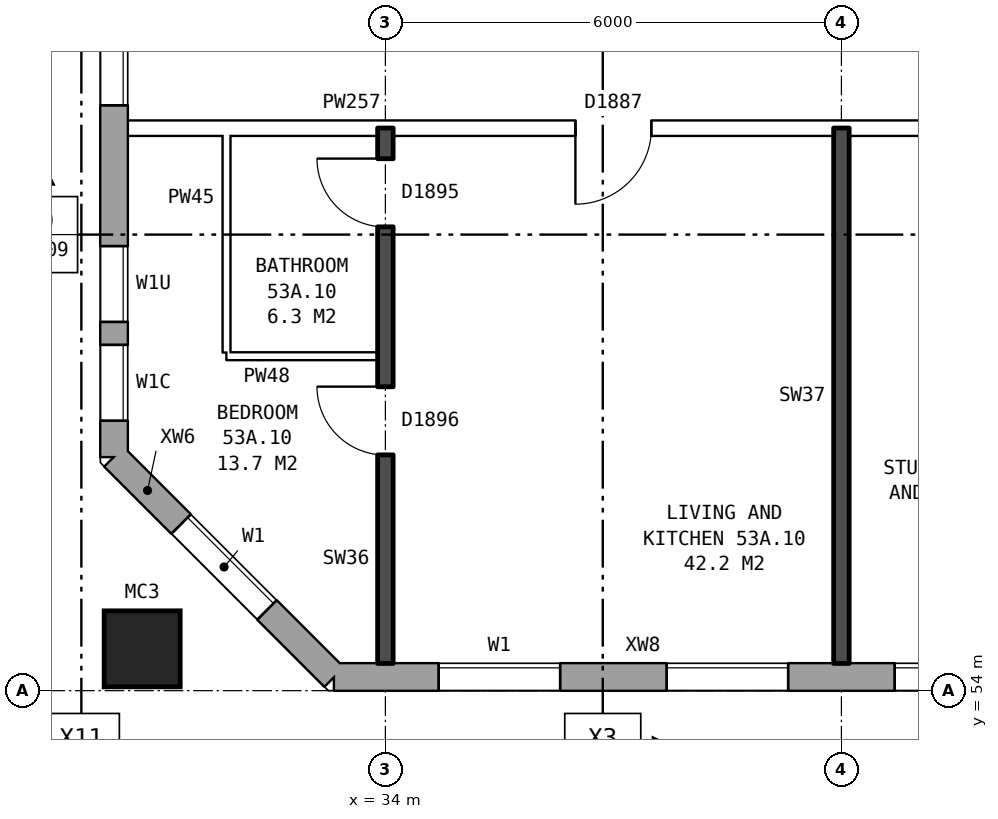
"""IFC4 building model, lengths in metres.
Left out: names, types, materials, properties, quantities, classifications, styles, units other than length and angle.
Written with IfcOpenShell. Run it as: python <this file> out.ifc"""

import sys

from ifc_helpers import new_model, si_unit, direction, frame, frame_2d, origin, origin_2d, place, context, subcontext, project, spatial, rectangle, hollow_rectangle, extrude, element, fill, save


model = new_model("IFC4")
c1 = context("Model", 3, precision=1e-05, world=origin(), true_north=direction((0.0, 1.0)))
c2 = subcontext(c1, "Body", "Model", "MODEL_VIEW")
j1 = project(units=[si_unit("LENGTHUNIT", "METRE"), si_unit("PLANEANGLEUNIT", "RADIAN")], contexts=[c1])
p1 = place(None, origin())
s1 = spatial("IfcSite", under=j1, at=p1, CompositionType="ELEMENT")
p2 = place(p1, origin())
s2 = spatial("IfcBuilding", under=s1, at=p2, CompositionType="ELEMENT")
p3 = place(p2, frame((0.0, 0.0, 188.2)))
s3 = spatial("IfcBuildingStorey", under=s2, at=p3, CompositionType="ELEMENT", Elevation=188.2)
p4 = place(p3, frame((30.8, 54.55, 0.0), z_axis=(0.0, 0.0, 1.0), x_axis=(1.0, 0.0, 0.0)))
e1 = element("IfcColumn", 1, at=p4, inside=s3, PredefinedType="COLUMN", context=c2, shape_type="SweptSolid", body=[
    extrude(hollow_rectangle(XDim=1.0, YDim=1.0, WallThickness=0.055, at=origin_2d()), origin(), (0.0, 0.0, 1.0), 3.1),
])
p5 = place(p3, frame((30.43, 57.075, 0.0), z_axis=(0.0, 0.0, 1.0), x_axis=(0.707106781187, -0.707106781187, 0.0)))
e2 = element("IfcWall", 2, at=p5, inside=s3, PredefinedType="STANDARD", context=c2, shape_type="SweptSolid", body=[
    extrude(rectangle(XDim=4.094, YDim=0.36, at=frame_2d((2.047, 0.0))), origin(), (0.0, 0.0, 1.0), 2.85),
])
p6 = place(p5, frame((1.247, 0.0, 0.8)))
e3 = element("IfcOpeningElement", 3, at=p6, cuts=e2, PredefinedType="OPENING", context=c2, shape_type="SweptSolid", body=[
    extrude(rectangle(XDim=1.6, YDim=1.8, at=frame_2d((0.8, 0.9))), frame((0.0, 0.19, 0.0), z_axis=(0.0, -1.0, 0.0), x_axis=(1.0, 0.0, 0.0)), (0.0, 0.0, 1.0), 0.38),
])
p7 = place(p3, frame((33.325, 54.18, 0.0), z_axis=(0.0, 0.0, 1.0), x_axis=(1.0, 0.0, 0.0)))
e4 = element("IfcWall", 4, at=p7, inside=s3, PredefinedType="STANDARD", context=c2, shape_type="SweptSolid", body=[
    extrude(rectangle(XDim=39.601, YDim=0.36, at=frame_2d((19.8, 0.0))), origin(), (0.0, 0.0, 1.0), 2.85),
])
p8 = place(p7, frame((1.375, 0.0, 0.8)))
e5 = element("IfcOpeningElement", 5, at=p8, cuts=e4, PredefinedType="OPENING", context=c2, shape_type="SweptSolid", body=[
    extrude(rectangle(XDim=1.6, YDim=1.8, at=frame_2d((0.8, 0.9))), frame((0.0, 0.19, 0.0), z_axis=(0.0, -1.0, 0.0), x_axis=(1.0, 0.0, 0.0)), (0.0, 0.0, 1.0), 0.38),
])
p9 = place(p7, frame((4.375, 0.0, 0.8)))
e6 = element("IfcOpeningElement", 6, at=p9, cuts=e4, PredefinedType="OPENING", context=c2, shape_type="SweptSolid", body=[
    extrude(rectangle(XDim=1.6, YDim=1.8, at=frame_2d((0.8, 0.9))), frame((0.0, 0.19, 0.0), z_axis=(0.0, -1.0, 0.0), x_axis=(1.0, 0.0, 0.0)), (0.0, 0.0, 1.0), 0.38),
])
p10 = place(p7, frame((7.375, 0.0, 0.8)))
e7 = element("IfcOpeningElement", 7, at=p10, cuts=e4, PredefinedType="OPENING", context=c2, shape_type="SweptSolid", body=[
    extrude(rectangle(XDim=1.6, YDim=1.8, at=frame_2d((0.8, 0.9))), frame((0.0, 0.19, 0.0), z_axis=(0.0, -1.0, 0.0), x_axis=(1.0, 0.0, 0.0)), (0.0, 0.0, 1.0), 0.38),
])
p11 = place(p7, frame((10.375, 0.0, 0.8)))
e8 = element("IfcOpeningElement", 8, at=p11, cuts=e4, PredefinedType="OPENING", context=c2, shape_type="SweptSolid", body=[
    extrude(rectangle(XDim=1.6, YDim=1.8, at=frame_2d((0.8, 0.9))), frame((0.0, 0.19, 0.0), z_axis=(0.0, -1.0, 0.0), x_axis=(1.0, 0.0, 0.0)), (0.0, 0.0, 1.0), 0.38),
])
p12 = place(p7, frame((12.875, 0.0, 0.8)))
e9 = element("IfcOpeningElement", 9, at=p12, cuts=e4, PredefinedType="OPENING", context=c2, shape_type="SweptSolid", body=[
    extrude(rectangle(XDim=1.2, YDim=1.8, at=frame_2d((0.6, 0.9))), frame((0.0, 0.19, 0.0), z_axis=(0.0, -1.0, 0.0), x_axis=(1.0, 0.0, 0.0)), (0.0, 0.0, 1.0), 0.38),
])
p13 = place(p7, frame((16.225, 0.0, 0.8)))
e10 = element("IfcOpeningElement", 10, at=p13, cuts=e4, PredefinedType="OPENING", context=c2, shape_type="SweptSolid", body=[
    extrude(rectangle(XDim=0.6, YDim=0.9, at=frame_2d((0.3, 0.45))), frame((0.0, 0.19, 0.0), z_axis=(0.0, -1.0, 0.0), x_axis=(1.0, 0.0, 0.0)), (0.0, 0.0, 1.0), 0.38),
])
p14 = place(p7, frame((19.375, 0.0, 0.8)))
e11 = element("IfcOpeningElement", 11, at=p14, cuts=e4, PredefinedType="OPENING", context=c2, shape_type="SweptSolid", body=[
    extrude(rectangle(XDim=1.6, YDim=1.8, at=frame_2d((0.8, 0.9))), frame((0.0, 0.19, 0.0), z_axis=(0.0, -1.0, 0.0), x_axis=(1.0, 0.0, 0.0)), (0.0, 0.0, 1.0), 0.38),
])
p15 = place(p7, frame((21.875, 0.0, 0.15)))
e12 = element("IfcOpeningElement", 12, at=p15, cuts=e4, PredefinedType="OPENING", context=c2, shape_type="SweptSolid", body=[
    extrude(rectangle(XDim=1.2, YDim=1.8, at=frame_2d((0.6, 0.9))), frame((0.0, 0.19, 0.0), z_axis=(0.0, -1.0, 0.0), x_axis=(1.0, 0.0, 0.0)), (0.0, 0.0, 1.0), 0.38),
])
p16 = place(p7, frame((25.375, 0.0, 0.8)))
e13 = element("IfcOpeningElement", 13, at=p16, cuts=e4, PredefinedType="OPENING", context=c2, shape_type="SweptSolid", body=[
    extrude(rectangle(XDim=1.6, YDim=1.8, at=frame_2d((0.8, 0.9))), frame((0.0, 0.19, 0.0), z_axis=(0.0, -1.0, 0.0), x_axis=(1.0, 0.0, 0.0)), (0.0, 0.0, 1.0), 0.38),
])
p17 = place(p7, frame((28.375, 0.0, 0.8)))
e14 = element("IfcOpeningElement", 14, at=p17, cuts=e4, PredefinedType="OPENING", context=c2, shape_type="SweptSolid", body=[
    extrude(rectangle(XDim=1.6, YDim=1.8, at=frame_2d((0.8, 0.9))), frame((0.0, 0.19, 0.0), z_axis=(0.0, -1.0, 0.0), x_axis=(1.0, 0.0, 0.0)), (0.0, 0.0, 1.0), 0.38),
])
p18 = place(p7, frame((31.375, 0.0, 0.8)))
e15 = element("IfcOpeningElement", 15, at=p18, cuts=e4, PredefinedType="OPENING", context=c2, shape_type="SweptSolid", body=[
    extrude(rectangle(XDim=1.6, YDim=1.8, at=frame_2d((0.8, 0.9))), frame((0.0, 0.19, 0.0), z_axis=(0.0, -1.0, 0.0), x_axis=(1.0, 0.0, 0.0)), (0.0, 0.0, 1.0), 0.38),
])
p19 = place(p7, frame((34.375, 0.0, 0.8)))
e16 = element("IfcOpeningElement", 16, at=p19, cuts=e4, PredefinedType="OPENING", context=c2, shape_type="SweptSolid", body=[
    extrude(rectangle(XDim=1.6, YDim=1.8, at=frame_2d((0.8, 0.9))), frame((0.0, 0.19, 0.0), z_axis=(0.0, -1.0, 0.0), x_axis=(1.0, 0.0, 0.0)), (0.0, 0.0, 1.0), 0.38),
])
p20 = place(p7, frame((37.375, 0.0, 0.8)))
e17 = element("IfcOpeningElement", 17, at=p20, cuts=e4, PredefinedType="OPENING", context=c2, shape_type="SweptSolid", body=[
    extrude(rectangle(XDim=1.6, YDim=1.8, at=frame_2d((0.8, 0.9))), frame((0.0, 0.19, 0.0), z_axis=(0.0, -1.0, 0.0), x_axis=(1.0, 0.0, 0.0)), (0.0, 0.0, 1.0), 0.38),
])
p21 = place(p7, frame((14.375, 0.0, 1.6)))
e18 = element("IfcOpeningElement", 18, at=p21, cuts=e4, PredefinedType="OPENING", context=c2, shape_type="SweptSolid", body=[
    extrude(rectangle(XDim=0.6, YDim=0.9, at=frame_2d((0.3, 0.45))), frame((0.0, 0.19, 0.0), z_axis=(0.0, -1.0, 0.0), x_axis=(1.0, 0.0, 0.0)), (0.0, 0.0, 1.0), 0.38),
])
p22 = place(p7, frame((17.125, 0.0, 0.8)))
e19 = element("IfcOpeningElement", 19, at=p22, cuts=e4, PredefinedType="OPENING", context=c2, shape_type="SweptSolid", body=[
    extrude(rectangle(XDim=1.2, YDim=1.8, at=frame_2d((0.6, 0.9))), frame((0.0, 0.19, 0.0), z_axis=(0.0, -1.0, 0.0), x_axis=(1.0, 0.0, 0.0)), (0.0, 0.0, 1.0), 0.38),
])
p23 = place(p7, frame((23.375, 0.0, 0.15)))
e20 = element("IfcOpeningElement", 20, at=p23, cuts=e4, PredefinedType="OPENING", context=c2, shape_type="SweptSolid", body=[
    extrude(rectangle(XDim=0.6, YDim=0.9, at=frame_2d((0.3, 0.45))), frame((0.0, 0.19, 0.0), z_axis=(0.0, -1.0, 0.0), x_axis=(1.0, 0.0, 0.0)), (0.0, 0.0, 1.0), 0.38),
])
p24 = place(p3, frame((30.43, 82.925, 0.0), z_axis=(0.0, 0.0, 1.0), x_axis=(0.0, -1.0, 0.0)))
e21 = element("IfcWall", 21, at=p24, inside=s3, PredefinedType="STANDARD", context=c2, shape_type="SweptSolid", body=[
    extrude(rectangle(XDim=25.851, YDim=0.36, at=frame_2d((12.925, 0.0))), origin(), (0.0, 0.0, 1.0), 2.85),
])
p25 = place(p24, frame((0.3, 0.0, 0.8)))
e22 = element("IfcOpeningElement", 22, at=p25, cuts=e21, PredefinedType="OPENING", context=c2, shape_type="SweptSolid", body=[
    extrude(rectangle(XDim=1.2, YDim=1.8, at=frame_2d((0.6, 0.9))), frame((0.0, 0.19, 0.0), z_axis=(0.0, -1.0, 0.0), x_axis=(1.0, 0.0, 0.0)), (0.0, 0.0, 1.0), 0.38),
])
p26 = place(p24, frame((4.625, 0.0, 0.8)))
e23 = element("IfcOpeningElement", 23, at=p26, cuts=e21, PredefinedType="OPENING", context=c2, shape_type="SweptSolid", body=[
    extrude(rectangle(XDim=1.6, YDim=1.8, at=frame_2d((0.8, 0.9))), frame((0.0, 0.19, 0.0), z_axis=(0.0, -1.0, 0.0), x_axis=(1.0, 0.0, 0.0)), (0.0, 0.0, 1.0), 0.38),
])
p27 = place(p24, frame((7.625, 0.0, 0.8)))
e24 = element("IfcOpeningElement", 24, at=p27, cuts=e21, PredefinedType="OPENING", context=c2, shape_type="SweptSolid", body=[
    extrude(rectangle(XDim=1.6, YDim=1.8, at=frame_2d((0.8, 0.9))), frame((0.0, 0.19, 0.0), z_axis=(0.0, -1.0, 0.0), x_axis=(1.0, 0.0, 0.0)), (0.0, 0.0, 1.0), 0.38),
])
p28 = place(p24, frame((10.625, 0.0, 0.8)))
e25 = element("IfcOpeningElement", 25, at=p28, cuts=e21, PredefinedType="OPENING", context=c2, shape_type="SweptSolid", body=[
    extrude(rectangle(XDim=1.6, YDim=1.8, at=frame_2d((0.8, 0.9))), frame((0.0, 0.19, 0.0), z_axis=(0.0, -1.0, 0.0), x_axis=(1.0, 0.0, 0.0)), (0.0, 0.0, 1.0), 0.38),
])
p29 = place(p24, frame((13.625, 0.0, 0.8)))
e26 = element("IfcOpeningElement", 26, at=p29, cuts=e21, PredefinedType="OPENING", context=c2, shape_type="SweptSolid", body=[
    extrude(rectangle(XDim=1.6, YDim=1.8, at=frame_2d((0.8, 0.9))), frame((0.0, 0.19, 0.0), z_axis=(0.0, -1.0, 0.0), x_axis=(1.0, 0.0, 0.0)), (0.0, 0.0, 1.0), 0.38),
])
p30 = place(p24, frame((16.625, 0.0, 0.8)))
e27 = element("IfcOpeningElement", 27, at=p30, cuts=e21, PredefinedType="OPENING", context=c2, shape_type="SweptSolid", body=[
    extrude(rectangle(XDim=1.6, YDim=1.8, at=frame_2d((0.8, 0.9))), frame((0.0, 0.19, 0.0), z_axis=(0.0, -1.0, 0.0), x_axis=(1.0, 0.0, 0.0)), (0.0, 0.0, 1.0), 0.38),
])
p31 = place(p24, frame((19.625, 0.0, 0.8)))
e28 = element("IfcOpeningElement", 28, at=p31, cuts=e21, PredefinedType="OPENING", context=c2, shape_type="SweptSolid", body=[
    extrude(rectangle(XDim=1.6, YDim=1.8, at=frame_2d((0.8, 0.9))), frame((0.0, 0.19, 0.0), z_axis=(0.0, -1.0, 0.0), x_axis=(1.0, 0.0, 0.0)), (0.0, 0.0, 1.0), 0.38),
])
p32 = place(p24, frame((23.075, 0.0, 0.8)))
e29 = element("IfcOpeningElement", 29, at=p32, cuts=e21, PredefinedType="OPENING", context=c2, shape_type="SweptSolid", body=[
    extrude(rectangle(XDim=1.0, YDim=0.9, at=frame_2d((0.5, 0.45))), frame((0.0, 0.19, 0.0), z_axis=(0.0, -1.0, 0.0), x_axis=(1.0, 0.0, 0.0)), (0.0, 0.0, 1.0), 0.38),
])
p33 = place(p24, frame((1.8, 0.0, 0.8)))
e30 = element("IfcOpeningElement", 30, at=p33, cuts=e21, PredefinedType="OPENING", context=c2, shape_type="SweptSolid", body=[
    extrude(rectangle(XDim=0.8, YDim=0.9, at=frame_2d((0.4, 0.45))), frame((0.0, 0.19, 0.0), z_axis=(0.0, -1.0, 0.0), x_axis=(1.0, 0.0, 0.0)), (0.0, 0.0, 1.0), 0.38),
])
p34 = place(p24, frame((24.375, 0.0, 0.8)))
e31 = element("IfcOpeningElement", 31, at=p34, cuts=e21, PredefinedType="OPENING", context=c2, shape_type="SweptSolid", body=[
    extrude(rectangle(XDim=1.0, YDim=1.8, at=frame_2d((0.5, 0.9))), frame((0.0, 0.19, 0.0), z_axis=(0.0, -1.0, 0.0), x_axis=(1.0, 0.0, 0.0)), (0.0, 0.0, 1.0), 0.38),
])
p35 = place(p3, frame((31.91, 58.4, 0.0), z_axis=(0.0, 0.0, 1.0), x_axis=(1.0, 0.0, 0.0)))
e32 = element("IfcWall", 32, at=p35, inside=s3, PredefinedType="PARTITIONING", context=c2, shape_type="SweptSolid", body=[
    extrude(rectangle(XDim=1.99, YDim=0.1, at=frame_2d((0.995, 0.0))), origin(), (0.0, 0.0, 1.0), 2.85),
])
p36 = place(p3, frame((30.61, 61.4, 0.0), z_axis=(0.0, 0.0, 1.0), x_axis=(1.0, 0.0, 0.0)))
e33 = element("IfcWall", 33, at=p36, inside=s3, PredefinedType="PARTITIONING", context=c2, shape_type="SweptSolid", body=[
    extrude(rectangle(XDim=15.29, YDim=0.2, at=frame_2d((7.645, 0.0))), origin(), (0.0, 0.0, 1.0), 2.85),
])
p37 = place(p36, frame((10.69, 0.0, 0.0)))
e34 = element("IfcOpeningElement", 34, at=p37, cuts=e33, PredefinedType="OPENING", context=c2, shape_type="SweptSolid", body=[
    extrude(rectangle(XDim=1.0, YDim=2.1, at=frame_2d((0.5, 1.05))), frame((0.0, 0.11, 0.0), z_axis=(0.0, -1.0, 0.0), x_axis=(1.0, 0.0, 0.0)), (0.0, 0.0, 1.0), 0.22),
])
p38 = place(p36, frame((5.89, 0.0, 0.0)))
e35 = element("IfcOpeningElement", 35, at=p38, cuts=e33, PredefinedType="OPENING", context=c2, shape_type="SweptSolid", body=[
    extrude(rectangle(XDim=1.0, YDim=2.1, at=frame_2d((0.5, 1.05))), frame((0.0, 0.11, 0.0), z_axis=(0.0, -1.0, 0.0), x_axis=(1.0, 0.0, 0.0)), (0.0, 0.0, 1.0), 0.22),
])
p39 = place(p3, frame((31.91, 58.45, 0.0), z_axis=(0.0, 0.0, 1.0), x_axis=(0.0, 1.0, 0.0)))
e36 = element("IfcWall", 36, at=p39, inside=s3, PredefinedType="PARTITIONING", context=c2, shape_type="SweptSolid", body=[
    extrude(rectangle(XDim=2.85, YDim=0.1, at=frame_2d((1.425, 0.0))), origin(), (0.0, 0.0, 1.0), 2.85),
])
p40 = place(p3, frame((34.0, 54.36, 0.0), z_axis=(0.0, 0.0, 1.0), x_axis=(0.0, 1.0, 0.0)))
e37 = element("IfcWall", 37, at=p40, inside=s3, PredefinedType="SOLIDWALL", context=c2, shape_type="SweptSolid", body=[
    extrude(rectangle(XDim=7.04, YDim=0.2, at=frame_2d((3.52, 0.0))), origin(), (0.0, 0.0, 1.0), 2.85),
])
p41 = place(p40, frame((2.74, 0.0, 0.0)))
e38 = element("IfcOpeningElement", 38, at=p41, cuts=e37, PredefinedType="OPENING", context=c2, shape_type="SweptSolid", body=[
    extrude(rectangle(XDim=0.9, YDim=2.1, at=frame_2d((0.45, 1.05))), frame((0.0, 0.11, 0.0), z_axis=(0.0, -1.0, 0.0), x_axis=(1.0, 0.0, 0.0)), (0.0, 0.0, 1.0), 0.22),
])
p42 = place(p40, frame((5.74, 0.0, 0.0)))
e39 = element("IfcOpeningElement", 39, at=p42, cuts=e37, PredefinedType="OPENING", context=c2, shape_type="SweptSolid", body=[
    extrude(rectangle(XDim=0.9, YDim=2.1, at=frame_2d((0.45, 1.05))), frame((0.0, 0.11, 0.0), z_axis=(0.0, -1.0, 0.0), x_axis=(1.0, 0.0, 0.0)), (0.0, 0.0, 1.0), 0.22),
])
p43 = place(p3, frame((40.0, 54.36, 0.0), z_axis=(0.0, 0.0, 1.0), x_axis=(0.0, 1.0, 0.0)))
e40 = element("IfcWall", 40, at=p43, inside=s3, PredefinedType="SOLIDWALL", context=c2, shape_type="SweptSolid", body=[
    extrude(rectangle(XDim=7.04, YDim=0.2, at=frame_2d((3.52, 0.0))), origin(), (0.0, 0.0, 1.0), 2.85),
])
p44 = place(p6, origin())
e41 = element("IfcWindow", 41, at=p44, inside=s3, PartitioningType="SINGLE_PANEL", PredefinedType="WINDOW", context=c2, shape_type="SweptSolid", body=[
    extrude(rectangle(XDim=1.6, YDim=1.8, at=frame_2d((0.8, 0.9))), frame((0.0, 0.15, 0.0), z_axis=(0.0, -1.0, 0.0), x_axis=(1.0, 0.0, 0.0)), (0.0, 0.0, 1.0), 0.06),
])
fill(e3, e41)
p45 = place(p8, origin())
e42 = element("IfcWindow", 42, at=p45, inside=s3, PartitioningType="SINGLE_PANEL", PredefinedType="WINDOW", context=c2, shape_type="SweptSolid", body=[
    extrude(rectangle(XDim=1.6, YDim=1.8, at=frame_2d((0.8, 0.9))), frame((0.0, 0.15, 0.0), z_axis=(0.0, -1.0, 0.0), x_axis=(1.0, 0.0, 0.0)), (0.0, 0.0, 1.0), 0.06),
])
fill(e5, e42)
p46 = place(p9, origin())
e43 = element("IfcWindow", 43, at=p46, inside=s3, PartitioningType="SINGLE_PANEL", PredefinedType="WINDOW", context=c2, shape_type="SweptSolid", body=[
    extrude(rectangle(XDim=1.6, YDim=1.8, at=frame_2d((0.8, 0.9))), frame((0.0, 0.15, 0.0), z_axis=(0.0, -1.0, 0.0), x_axis=(1.0, 0.0, 0.0)), (0.0, 0.0, 1.0), 0.06),
])
fill(e6, e43)
p47 = place(p10, origin())
e44 = element("IfcWindow", 44, at=p47, inside=s3, PartitioningType="SINGLE_PANEL", PredefinedType="WINDOW", context=c2, shape_type="SweptSolid", body=[
    extrude(rectangle(XDim=1.6, YDim=1.8, at=frame_2d((0.8, 0.9))), frame((0.0, 0.15, 0.0), z_axis=(0.0, -1.0, 0.0), x_axis=(1.0, 0.0, 0.0)), (0.0, 0.0, 1.0), 0.06),
])
fill(e7, e44)
p48 = place(p31, origin())
e45 = element("IfcWindow", 45, at=p48, inside=s3, PartitioningType="SINGLE_PANEL", PredefinedType="WINDOW", context=c2, shape_type="SweptSolid", body=[
    extrude(rectangle(XDim=1.6, YDim=1.8, at=frame_2d((0.8, 0.9))), frame((0.0, 0.15, 0.0), z_axis=(0.0, -1.0, 0.0), x_axis=(1.0, 0.0, 0.0)), (0.0, 0.0, 1.0), 0.06),
])
fill(e28, e45)
p49 = place(p32, origin())
e46 = element("IfcWindow", 46, at=p49, inside=s3, PartitioningType="SINGLE_PANEL", PredefinedType="WINDOW", context=c2, shape_type="SweptSolid", body=[
    extrude(rectangle(XDim=1.0, YDim=0.9, at=frame_2d((0.5, 0.45))), frame((0.0, 0.15, 0.0), z_axis=(0.0, -1.0, 0.0), x_axis=(1.0, 0.0, 0.0)), (0.0, 0.0, 1.0), 0.06),
])
fill(e29, e46)
p50 = place(p41, origin())
e47 = element("IfcDoor", 47, at=p50, inside=s3, OperationType="SINGLE_SWING_RIGHT", PredefinedType="DOOR", context=c2, shape_type="SweptSolid", body=[
    extrude(rectangle(XDim=0.9, YDim=2.1, at=frame_2d((0.45, 1.05))), frame((0.0, 0.025, 0.0), z_axis=(0.0, -1.0, 0.0), x_axis=(1.0, 0.0, 0.0)), (0.0, 0.0, 1.0), 0.05),
])
fill(e38, e47)
p51 = place(p38, frame((1.0, 0.0, 0.0), z_axis=(0.0, 0.0, 1.0), x_axis=(-1.0, 0.0, 0.0)))
e48 = element("IfcDoor", 48, at=p51, inside=s3, OperationType="SINGLE_SWING_RIGHT", PredefinedType="DOOR", context=c2, shape_type="SweptSolid", body=[
    extrude(rectangle(XDim=1.0, YDim=2.1, at=frame_2d((0.5, 1.05))), frame((0.0, 0.025, 0.0), z_axis=(0.0, -1.0, 0.0), x_axis=(1.0, 0.0, 0.0)), (0.0, 0.0, 1.0), 0.05),
])
fill(e35, e48)
p52 = place(p42, origin())
e49 = element("IfcDoor", 49, at=p52, inside=s3, OperationType="SINGLE_SWING_RIGHT", PredefinedType="DOOR", context=c2, shape_type="SweptSolid", body=[
    extrude(rectangle(XDim=0.9, YDim=2.1, at=frame_2d((0.45, 1.05))), frame((0.0, 0.025, 0.0), z_axis=(0.0, -1.0, 0.0), x_axis=(1.0, 0.0, 0.0)), (0.0, 0.0, 1.0), 0.05),
])
fill(e39, e49)
p53 = place(p34, origin())
e50 = element("IfcWindow", 50, at=p53, inside=s3, PartitioningType="SINGLE_PANEL", PredefinedType="WINDOW", context=c2, shape_type="SweptSolid", body=[
    extrude(rectangle(XDim=1.0, YDim=1.8, at=frame_2d((0.5, 0.9))), frame((0.0, 0.15, 0.0), z_axis=(0.0, -1.0, 0.0), x_axis=(1.0, 0.0, 0.0)), (0.0, 0.0, 1.0), 0.06),
])
fill(e31, e50)
save(model, sys.argv[1])
